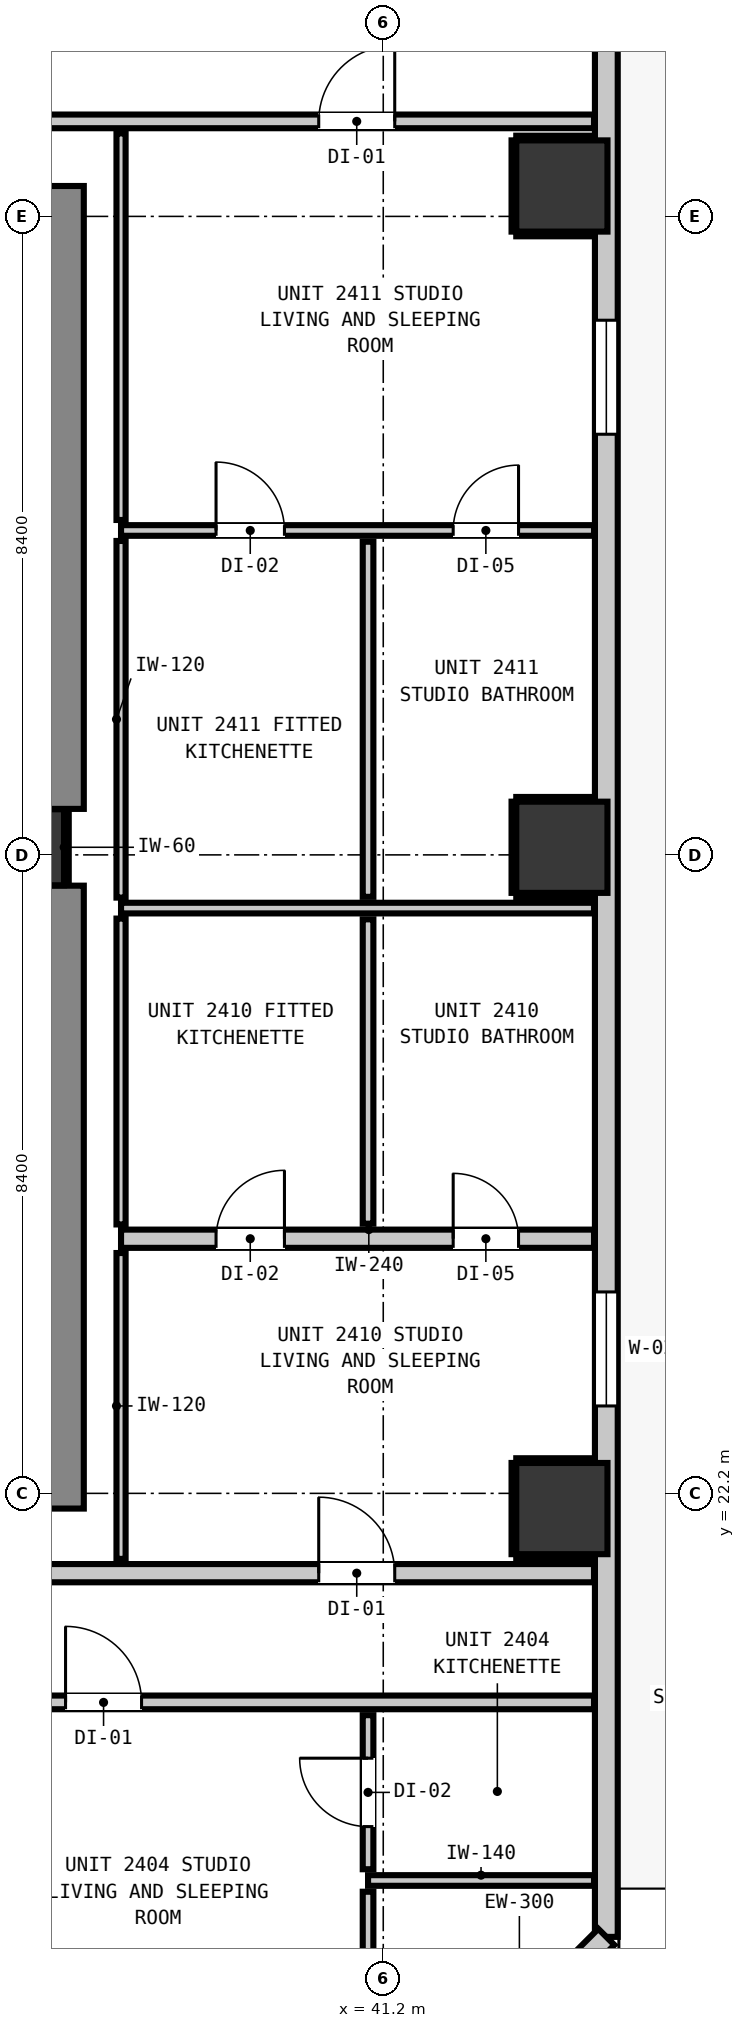
"""IFC4 building model, lengths in metres.
Left out: names, types, materials, properties, quantities, classifications, styles, units other than length and angle.
Written with IfcOpenShell. Run it as: python <this file> out.ifc"""

import sys

from ifc_helpers import new_model, si_unit, direction, frame, frame_2d, origin, origin_2d, place, context, subcontext, project, spatial, rectangle, extrude, element, fill, save


model = new_model("IFC4")
c1 = context("Model", 3, precision=1e-05, world=origin(), true_north=direction((0.0, 1.0)))
c2 = subcontext(c1, "Body", "Model", "MODEL_VIEW")
j1 = project(units=[si_unit("LENGTHUNIT", "METRE"), si_unit("PLANEANGLEUNIT", "RADIAN")], contexts=[c1])
p1 = place(None, origin())
s1 = spatial("IfcSite", under=j1, at=p1, CompositionType="ELEMENT")
p2 = place(p1, origin())
s2 = spatial("IfcBuilding", under=s1, at=p2, CompositionType="ELEMENT")
p3 = place(p2, frame((0.0, 0.0, 85.08)))
s3 = spatial("IfcBuildingStorey", under=s2, at=p3, CompositionType="ELEMENT", Elevation=85.08)
p4 = place(p3, frame((36.5, 30.7, 0.0), z_axis=(0.0, 0.0, 1.0), x_axis=(1.0, 0.0, 0.0)))
e1 = element("IfcColumn", 1, at=p4, inside=s3, PredefinedType="COLUMN", context=c2, shape_type="SweptSolid", body=[
    extrude(rectangle(XDim=1.0, YDim=1.0, at=origin_2d()), origin(), (0.0, 0.0, 1.0), 3.32),
])
p5 = place(p3, frame((36.66, 22.0, 0.0), z_axis=(0.0, 0.0, 1.0), x_axis=(0.0, 1.0, 0.0)))
e2 = element("IfcWall", 2, at=p5, inside=s3, PredefinedType="SHEAR", context=c2, shape_type="SweptSolid", body=[
    extrude(rectangle(XDim=8.195, YDim=1.2, at=frame_2d((4.098, 0.0))), origin(), (0.0, 0.0, 1.0), 3.32),
])
p6 = place(p3, frame((36.66, 31.205, 0.0), z_axis=(0.0, 0.0, 1.0), x_axis=(0.0, 1.0, 0.0)))
e3 = element("IfcWall", 3, at=p6, inside=s3, PredefinedType="SHEAR", context=c2, shape_type="SweptSolid", body=[
    extrude(rectangle(XDim=8.195, YDim=1.2, at=frame_2d((4.097, 0.0))), origin(), (0.0, 0.0, 1.0), 3.32),
])
for number, where, z_axis, x_axis in (
    (4, (43.55, 22.0, 0.0), (0.0, 0.0, 1.0), (1.0, 0.0, 0.0)),
    (5, (43.55, 30.7, 0.0), (0.0, 0.0, 1.0), (1.0, 0.0, 0.0)),
    (6, (43.55, 39.4, 0.0), (0.0, 0.0, 1.0), (1.0, 0.0, 0.0)),
):
    element("IfcColumn", number, at=place(p3, frame(where, z_axis=z_axis, x_axis=x_axis)), inside=s3, PredefinedType="COLUMN", context=c2, shape_type="SweptSolid", body=[
        extrude(rectangle(XDim=1.2, YDim=1.2, at=origin_2d()), origin(), (0.0, 0.0, 1.0), 3.32),
    ])
p7 = place(p3, frame((44.135, 51.035, 0.0), z_axis=(0.0, 0.0, 1.0), x_axis=(0.0, -1.0, 0.0)))
e7 = element("IfcWall", 7, at=p7, inside=s3, PredefinedType="STANDARD", context=c2, shape_type="SweptSolid", body=[
    extrude(rectangle(XDim=34.67, YDim=0.3, at=frame_2d((17.335, 0.0))), origin(), (0.0, 0.0, 1.0), 2.96),
])
p8 = place(p7, frame((0.901, 0.0, 0.0)))
e8 = element("IfcOpeningElement", 8, at=p8, cuts=e7, PredefinedType="OPENING", context=c2, shape_type="SweptSolid", body=[
    extrude(rectangle(XDim=1.0, YDim=2.15, at=frame_2d((0.5, 1.075))), frame((0.0, 0.16, 0.0), z_axis=(0.0, -1.0, 0.0), x_axis=(1.0, 0.0, 0.0)), (0.0, 0.0, 1.0), 0.32),
])
p9 = place(p7, frame((26.185, 0.0, 0.85)))
e9 = element("IfcOpeningElement", 9, at=p9, cuts=e7, PredefinedType="OPENING", context=c2, shape_type="SweptSolid", body=[
    extrude(rectangle(XDim=1.5, YDim=1.8, at=frame_2d((0.75, 0.9))), frame((0.0, 0.16, 0.0), z_axis=(0.0, -1.0, 0.0), x_axis=(1.0, 0.0, 0.0)), (0.0, 0.0, 1.0), 0.32),
])
p10 = place(p7, frame((13.401, 0.0, 0.85)))
e10 = element("IfcOpeningElement", 10, at=p10, cuts=e7, PredefinedType="OPENING", context=c2, shape_type="SweptSolid", body=[
    extrude(rectangle(XDim=1.5, YDim=1.8, at=frame_2d((0.75, 0.9))), frame((0.0, 0.16, 0.0), z_axis=(0.0, -1.0, 0.0), x_axis=(1.0, 0.0, 0.0)), (0.0, 0.0, 1.0), 0.32),
])
p11 = place(p3, frame((44.135, 16.365, 0.0), z_axis=(0.0, 0.0, 1.0), x_axis=(-0.707106781187, -0.707106781187, 0.0)))
e11 = element("IfcWall", 11, at=p11, inside=s3, PredefinedType="STANDARD", context=c2, shape_type="SweptSolid", body=[
    extrude(rectangle(XDim=3.536, YDim=0.3, at=frame_2d((1.768, 0.0))), origin(), (0.0, 0.0, 1.0), 2.96),
])
p12 = place(p3, frame((12.993, 21.15, 0.0), z_axis=(0.0, 0.0, 1.0), x_axis=(1.0, 0.0, 0.0)))
e12 = element("IfcWall", 12, at=p12, inside=s3, PredefinedType="PARTITIONING", context=c2, shape_type="SweptSolid", body=[
    extrude(rectangle(XDim=30.98, YDim=0.24, at=frame_2d((15.49, 0.0))), origin(), (0.0, 0.0, 1.0), 2.96),
])
p13 = place(p12, frame((5.217, 0.0, 0.0)))
e13 = element("IfcOpeningElement", 13, at=p13, cuts=e12, PredefinedType="OPENING", context=c2, shape_type="SweptSolid", body=[
    extrude(rectangle(XDim=1.1, YDim=2.15, at=frame_2d((0.55, 1.075))), frame((0.0, 0.13, 0.0), z_axis=(0.0, -1.0, 0.0), x_axis=(1.0, 0.0, 0.0)), (0.0, 0.0, 1.0), 0.26),
])
p14 = place(p12, frame((27.358, 0.0, 0.0)))
e14 = element("IfcOpeningElement", 14, at=p14, cuts=e12, PredefinedType="OPENING", context=c2, shape_type="SweptSolid", body=[
    extrude(rectangle(XDim=1.0, YDim=2.15, at=frame_2d((0.5, 1.075))), frame((0.0, 0.13, 0.0), z_axis=(0.0, -1.0, 0.0), x_axis=(1.0, 0.0, 0.0)), (0.0, 0.0, 1.0), 0.26),
])
p15 = place(p3, frame((37.75, 25.55, 0.0), z_axis=(0.0, 0.0, 1.0), x_axis=(1.0, 0.0, 0.0)))
e15 = element("IfcWall", 15, at=p15, inside=s3, PredefinedType="PARTITIONING", context=c2, shape_type="SweptSolid", body=[
    extrude(rectangle(XDim=6.223, YDim=0.24, at=frame_2d((3.111, 0.0))), origin(), (0.0, 0.0, 1.0), 2.96),
])
p16 = place(p15, frame((1.25, 0.0, 0.0)))
e16 = element("IfcOpeningElement", 16, at=p16, cuts=e15, PredefinedType="OPENING", context=c2, shape_type="SweptSolid", body=[
    extrude(rectangle(XDim=0.9, YDim=2.1, at=frame_2d((0.45, 1.05))), frame((0.0, 0.13, 0.0), z_axis=(0.0, -1.0, 0.0), x_axis=(1.0, 0.0, 0.0)), (0.0, 0.0, 1.0), 0.26),
])
p17 = place(p15, frame((4.37, 0.0, 0.0)))
e17 = element("IfcOpeningElement", 17, at=p17, cuts=e15, PredefinedType="OPENING", context=c2, shape_type="SweptSolid", body=[
    extrude(rectangle(XDim=0.86, YDim=2.02, at=frame_2d((0.43, 1.01))), frame((0.0, 0.13, 0.0), z_axis=(0.0, -1.0, 0.0), x_axis=(1.0, 0.0, 0.0)), (0.0, 0.0, 1.0), 0.26),
])
p18 = place(p3, frame((12.993, 19.45, 0.0), z_axis=(0.0, 0.0, 1.0), x_axis=(1.0, 0.0, 0.0)))
e18 = element("IfcWall", 18, at=p18, inside=s3, PredefinedType="PARTITIONING", context=c2, shape_type="SweptSolid", body=[
    extrude(rectangle(XDim=30.98, YDim=0.18, at=frame_2d((15.49, 0.0))), origin(), (0.0, 0.0, 1.0), 2.96),
])
p19 = place(p18, frame((0.11, 0.0, 0.0)))
e19 = element("IfcOpeningElement", 19, at=p19, cuts=e18, PredefinedType="OPENING", context=c2, shape_type="SweptSolid", body=[
    extrude(rectangle(XDim=1.0, YDim=2.15, at=frame_2d((0.5, 1.075))), frame((0.0, 0.1, 0.0), z_axis=(0.0, -1.0, 0.0), x_axis=(1.0, 0.0, 0.0)), (0.0, 0.0, 1.0), 0.2),
])
p20 = place(p18, frame((7.423, 0.0, 0.0)))
e20 = element("IfcOpeningElement", 20, at=p20, cuts=e18, PredefinedType="OPENING", context=c2, shape_type="SweptSolid", body=[
    extrude(rectangle(XDim=1.0, YDim=2.15, at=frame_2d((0.5, 1.075))), frame((0.0, 0.1, 0.0), z_axis=(0.0, -1.0, 0.0), x_axis=(1.0, 0.0, 0.0)), (0.0, 0.0, 1.0), 0.2),
])
p21 = place(p18, frame((16.083, 0.0, 0.0)))
e21 = element("IfcOpeningElement", 21, at=p21, cuts=e18, PredefinedType="OPENING", context=c2, shape_type="SweptSolid", body=[
    extrude(rectangle(XDim=1.0, YDim=2.15, at=frame_2d((0.5, 1.075))), frame((0.0, 0.1, 0.0), z_axis=(0.0, -1.0, 0.0), x_axis=(1.0, 0.0, 0.0)), (0.0, 0.0, 1.0), 0.2),
])
p22 = place(p18, frame((24.027, 0.0, 0.0)))
e22 = element("IfcOpeningElement", 22, at=p22, cuts=e18, PredefinedType="OPENING", context=c2, shape_type="SweptSolid", body=[
    extrude(rectangle(XDim=1.0, YDim=2.15, at=frame_2d((0.5, 1.075))), frame((0.0, 0.1, 0.0), z_axis=(0.0, -1.0, 0.0), x_axis=(1.0, 0.0, 0.0)), (0.0, 0.0, 1.0), 0.2),
])
p23 = place(p3, frame((1.827, 40.25, 0.0), z_axis=(0.0, 0.0, 1.0), x_axis=(1.0, 0.0, 0.0)))
e23 = element("IfcWall", 23, at=p23, inside=s3, PredefinedType="PARTITIONING", context=c2, shape_type="SweptSolid", body=[
    extrude(rectangle(XDim=42.146, YDim=0.18, at=frame_2d((21.073, 0.0))), origin(), (0.0, 0.0, 1.0), 2.96),
])
p24 = place(p23, frame((15.608, 0.0, 0.0)))
e24 = element("IfcOpeningElement", 24, at=p24, cuts=e23, PredefinedType="OPENING", context=c2, shape_type="SweptSolid", body=[
    extrude(rectangle(XDim=1.4, YDim=2.15, at=frame_2d((0.7, 1.075))), frame((0.0, 0.1, 0.0), z_axis=(0.0, -1.0, 0.0), x_axis=(1.0, 0.0, 0.0)), (0.0, 0.0, 1.0), 0.2),
])
p25 = place(p23, frame((8.647, 0.0, 0.0)))
e25 = element("IfcOpeningElement", 25, at=p25, cuts=e23, PredefinedType="OPENING", context=c2, shape_type="SweptSolid", body=[
    extrude(rectangle(XDim=1.4, YDim=2.15, at=frame_2d((0.7, 1.075))), frame((0.0, 0.1, 0.0), z_axis=(0.0, -1.0, 0.0), x_axis=(1.0, 0.0, 0.0)), (0.0, 0.0, 1.0), 0.2),
])
p26 = place(p23, frame((38.524, 0.0, 0.0)))
e26 = element("IfcOpeningElement", 26, at=p26, cuts=e23, PredefinedType="OPENING", context=c2, shape_type="SweptSolid", body=[
    extrude(rectangle(XDim=1.0, YDim=2.15, at=frame_2d((0.5, 1.075))), frame((0.0, 0.1, 0.0), z_axis=(0.0, -1.0, 0.0), x_axis=(1.0, 0.0, 0.0)), (0.0, 0.0, 1.0), 0.2),
])
p27 = place(p3, frame((41.0, 17.107, 0.0), z_axis=(0.0, 0.0, 1.0), x_axis=(1.0, 0.0, 0.0)))
e27 = element("IfcWall", 27, at=p27, inside=s3, PredefinedType="PARTITIONING", context=c2, shape_type="SweptSolid", body=[
    extrude(rectangle(XDim=2.973, YDim=0.14, at=frame_2d((1.486, 0.0))), origin(), (0.0, 0.0, 1.0), 2.96),
])
p28 = place(p3, frame((37.75, 29.9, 0.0), z_axis=(0.0, 0.0, 1.0), x_axis=(1.0, 0.0, 0.0)))
e28 = element("IfcWall", 28, at=p28, inside=s3, PredefinedType="PARTITIONING", context=c2, shape_type="SweptSolid", body=[
    extrude(rectangle(XDim=6.223, YDim=0.14, at=frame_2d((3.111, 0.0))), origin(), (0.0, 0.0, 1.0), 2.96),
])
p29 = place(p3, frame((37.75, 34.868, 0.0), z_axis=(0.0, 0.0, 1.0), x_axis=(1.0, 0.0, 0.0)))
e29 = element("IfcWall", 29, at=p29, inside=s3, PredefinedType="PARTITIONING", context=c2, shape_type="SweptSolid", body=[
    extrude(rectangle(XDim=6.223, YDim=0.14, at=frame_2d((3.111, 0.0))), origin(), (0.0, 0.0, 1.0), 2.96),
])
p30 = place(p29, frame((1.25, 0.0, 0.0)))
e30 = element("IfcOpeningElement", 30, at=p30, cuts=e29, PredefinedType="OPENING", context=c2, shape_type="SweptSolid", body=[
    extrude(rectangle(XDim=0.9, YDim=2.1, at=frame_2d((0.45, 1.05))), frame((0.0, 0.08, 0.0), z_axis=(0.0, -1.0, 0.0), x_axis=(1.0, 0.0, 0.0)), (0.0, 0.0, 1.0), 0.16),
])
p31 = place(p29, frame((4.37, 0.0, 0.0)))
e31 = element("IfcOpeningElement", 31, at=p31, cuts=e29, PredefinedType="OPENING", context=c2, shape_type="SweptSolid", body=[
    extrude(rectangle(XDim=0.86, YDim=2.02, at=frame_2d((0.43, 1.01))), frame((0.0, 0.08, 0.0), z_axis=(0.0, -1.0, 0.0), x_axis=(1.0, 0.0, 0.0)), (0.0, 0.0, 1.0), 0.16),
])
p32 = place(p3, frame((41.0, 14.027, 0.0), z_axis=(0.0, 0.0, 1.0), x_axis=(0.0, 1.0, 0.0)))
e32 = element("IfcWall", 32, at=p32, inside=s3, PredefinedType="PARTITIONING", context=c2, shape_type="SweptSolid", body=[
    extrude(rectangle(XDim=2.932, YDim=0.14, at=frame_2d((1.466, 0.0))), origin(), (0.0, 0.0, 1.0), 2.96),
])
p33 = place(p32, frame((1.109, 0.0, 0.0)))
e33 = element("IfcOpeningElement", 33, at=p33, cuts=e32, PredefinedType="OPENING", context=c2, shape_type="SweptSolid", body=[
    extrude(rectangle(XDim=0.86, YDim=2.02, at=frame_2d((0.43, 1.01))), frame((0.0, 0.08, 0.0), z_axis=(0.0, -1.0, 0.0), x_axis=(1.0, 0.0, 0.0)), (0.0, 0.0, 1.0), 0.16),
])
p34 = place(p3, frame((41.0, 17.255, 0.0), z_axis=(0.0, 0.0, 1.0), x_axis=(0.0, 1.0, 0.0)))
e34 = element("IfcWall", 34, at=p34, inside=s3, PredefinedType="PARTITIONING", context=c2, shape_type="SweptSolid", body=[
    extrude(rectangle(XDim=2.027, YDim=0.14, at=frame_2d((1.014, 0.0))), origin(), (0.0, 0.0, 1.0), 2.96),
])
p35 = place(p34, frame((0.561, 0.0, 0.0)))
e35 = element("IfcOpeningElement", 35, at=p35, cuts=e34, PredefinedType="OPENING", context=c2, shape_type="SweptSolid", body=[
    extrude(rectangle(XDim=0.9, YDim=2.1, at=frame_2d((0.45, 1.05))), frame((0.0, 0.08, 0.0), z_axis=(0.0, -1.0, 0.0), x_axis=(1.0, 0.0, 0.0)), (0.0, 0.0, 1.0), 0.16),
])
p36 = place(p3, frame((41.0, 25.748, 0.0), z_axis=(0.0, 0.0, 1.0), x_axis=(0.0, 1.0, 0.0)))
e36 = element("IfcWall", 36, at=p36, inside=s3, PredefinedType="PARTITIONING", context=c2, shape_type="SweptSolid", body=[
    extrude(rectangle(XDim=4.004, YDim=0.14, at=frame_2d((2.002, 0.0))), origin(), (0.0, 0.0, 1.0), 2.96),
])
p37 = place(p3, frame((41.0, 30.048, 0.0), z_axis=(0.0, 0.0, 1.0), x_axis=(0.0, 1.0, 0.0)))
e37 = element("IfcWall", 37, at=p37, inside=s3, PredefinedType="PARTITIONING", context=c2, shape_type="SweptSolid", body=[
    extrude(rectangle(XDim=4.672, YDim=0.14, at=frame_2d((2.336, 0.0))), origin(), (0.0, 0.0, 1.0), 2.96),
])
p38 = place(p3, frame((37.75, 21.338, 0.0), z_axis=(0.0, 0.0, 1.0), x_axis=(0.0, 1.0, 0.0)))
e38 = element("IfcWall", 38, at=p38, inside=s3, PredefinedType="PARTITIONING", context=c2, shape_type="SweptSolid", body=[
    extrude(rectangle(XDim=4.024, YDim=0.12, at=frame_2d((2.012, 0.0))), origin(), (0.0, 0.0, 1.0), 2.96),
])
p39 = place(p3, frame((37.75, 25.738, 0.0), z_axis=(0.0, 0.0, 1.0), x_axis=(0.0, 1.0, 0.0)))
e39 = element("IfcWall", 39, at=p39, inside=s3, PredefinedType="PARTITIONING", context=c2, shape_type="SweptSolid", body=[
    extrude(rectangle(XDim=4.024, YDim=0.12, at=frame_2d((2.012, 0.0))), origin(), (0.0, 0.0, 1.0), 2.96),
])
p40 = place(p3, frame((37.75, 30.038, 0.0), z_axis=(0.0, 0.0, 1.0), x_axis=(0.0, 1.0, 0.0)))
e40 = element("IfcWall", 40, at=p40, inside=s3, PredefinedType="PARTITIONING", context=c2, shape_type="SweptSolid", body=[
    extrude(rectangle(XDim=4.692, YDim=0.12, at=frame_2d((2.346, 0.0))), origin(), (0.0, 0.0, 1.0), 2.96),
])
p41 = place(p3, frame((37.75, 35.006, 0.0), z_axis=(0.0, 0.0, 1.0), x_axis=(0.0, 1.0, 0.0)))
e41 = element("IfcWall", 41, at=p41, inside=s3, PredefinedType="PARTITIONING", context=c2, shape_type="SweptSolid", body=[
    extrude(rectangle(XDim=5.086, YDim=0.12, at=frame_2d((2.543, 0.0))), origin(), (0.0, 0.0, 1.0), 2.96),
])
p42 = place(p3, frame((37.032, 30.21, 0.0), z_axis=(0.0, 0.0, 1.0), x_axis=(0.0, 1.0, 0.0)))
e42 = element("IfcWall", 42, at=p42, inside=s3, PredefinedType="PARTITIONING", context=c2, shape_type="SweptSolid", body=[
    extrude(rectangle(XDim=0.98, YDim=0.06, at=frame_2d((0.49, 0.0))), origin(), (0.0, 0.0, 1.0), 1.45),
])
for number, where, z_axis, x_axis in (
    (43, (42.95, 21.368, 0.0), (0.0, 0.0, 1.0), (1.0, 0.0, 0.0)),
    (44, (42.95, 22.632, 0.0), (0.0, 0.0, 1.0), (1.0, 0.0, 0.0)),
):
    element("IfcWall", number, at=place(p3, frame(where, z_axis=z_axis, x_axis=x_axis)), inside=s3, PredefinedType="PARTITIONING", context=c2, shape_type="SweptSolid", body=[
        extrude(rectangle(XDim=1.02, YDim=0.06, at=frame_2d((0.51, 0.0))), origin(), (0.0, 0.0, 1.0), 1.45),
    ])
p43 = place(p3, frame((42.918, 21.4, 0.0), z_axis=(0.0, 0.0, 1.0), x_axis=(0.0, 1.0, 0.0)))
e45 = element("IfcWall", 45, at=p43, inside=s3, PredefinedType="PARTITIONING", context=c2, shape_type="SweptSolid", body=[
    extrude(rectangle(XDim=1.2, YDim=0.06, at=frame_2d((0.6, 0.0))), origin(), (0.0, 0.0, 1.0), 1.45),
])
for number, where, z_axis, x_axis in (
    (46, (42.95, 30.068, 0.0), (0.0, 0.0, 1.0), (1.0, 0.0, 0.0)),
    (47, (42.95, 31.332, 0.0), (0.0, 0.0, 1.0), (1.0, 0.0, 0.0)),
):
    element("IfcWall", number, at=place(p3, frame(where, z_axis=z_axis, x_axis=x_axis)), inside=s3, PredefinedType="PARTITIONING", context=c2, shape_type="SweptSolid", body=[
        extrude(rectangle(XDim=1.02, YDim=0.06, at=frame_2d((0.51, 0.0))), origin(), (0.0, 0.0, 1.0), 1.45),
    ])
p44 = place(p3, frame((42.918, 30.1, 0.0), z_axis=(0.0, 0.0, 1.0), x_axis=(0.0, 1.0, 0.0)))
e48 = element("IfcWall", 48, at=p44, inside=s3, PredefinedType="PARTITIONING", context=c2, shape_type="SweptSolid", body=[
    extrude(rectangle(XDim=1.2, YDim=0.06, at=frame_2d((0.6, 0.0))), origin(), (0.0, 0.0, 1.0), 1.45),
])
for number, where, z_axis, x_axis in (
    (49, (42.95, 38.768, 0.0), (0.0, 0.0, 1.0), (1.0, 0.0, 0.0)),
    (50, (42.95, 40.032, 0.0), (0.0, 0.0, 1.0), (1.0, 0.0, 0.0)),
):
    element("IfcWall", number, at=place(p3, frame(where, z_axis=z_axis, x_axis=x_axis)), inside=s3, PredefinedType="PARTITIONING", context=c2, shape_type="SweptSolid", body=[
        extrude(rectangle(XDim=1.02, YDim=0.06, at=frame_2d((0.51, 0.0))), origin(), (0.0, 0.0, 1.0), 1.45),
    ])
p45 = place(p3, frame((42.918, 38.8, 0.0), z_axis=(0.0, 0.0, 1.0), x_axis=(0.0, 1.0, 0.0)))
e51 = element("IfcWall", 51, at=p45, inside=s3, PredefinedType="PARTITIONING", context=c2, shape_type="SweptSolid", body=[
    extrude(rectangle(XDim=1.2, YDim=0.06, at=frame_2d((0.6, 0.0))), origin(), (0.0, 0.0, 1.0), 1.45),
])
p46 = place(p9, origin())
e52 = element("IfcWindow", 52, at=p46, inside=s3, PartitioningType="SINGLE_PANEL", PredefinedType="WINDOW", context=c2, shape_type="SweptSolid", body=[
    extrude(rectangle(XDim=1.5, YDim=1.8, at=frame_2d((0.75, 0.9))), frame((0.0, 0.03, 0.0), z_axis=(0.0, -1.0, 0.0), x_axis=(1.0, 0.0, 0.0)), (0.0, 0.0, 1.0), 0.06),
])
fill(e9, e52)
p47 = place(p10, origin())
e53 = element("IfcWindow", 53, at=p47, inside=s3, PartitioningType="SINGLE_PANEL", PredefinedType="WINDOW", context=c2, shape_type="SweptSolid", body=[
    extrude(rectangle(XDim=1.5, YDim=1.8, at=frame_2d((0.75, 0.9))), frame((0.0, 0.03, 0.0), z_axis=(0.0, -1.0, 0.0), x_axis=(1.0, 0.0, 0.0)), (0.0, 0.0, 1.0), 0.06),
])
fill(e10, e53)
p48 = place(p22, origin())
e54 = element("IfcDoor", 54, at=p48, inside=s3, OperationType="SINGLE_SWING_LEFT", PredefinedType="DOOR", context=c2, shape_type="SweptSolid", body=[
    extrude(rectangle(XDim=1.0, YDim=2.15, at=frame_2d((0.5, 1.075))), frame((0.0, 0.025, 0.0), z_axis=(0.0, -1.0, 0.0), x_axis=(1.0, 0.0, 0.0)), (0.0, 0.0, 1.0), 0.05),
])
fill(e22, e54)
p49 = place(p35, origin())
e55 = element("IfcDoor", 55, at=p49, inside=s3, OperationType="SINGLE_SWING_RIGHT", PredefinedType="DOOR", context=c2, shape_type="SweptSolid", body=[
    extrude(rectangle(XDim=0.9, YDim=2.1, at=frame_2d((0.45, 1.05))), frame((0.0, 0.025, 0.0), z_axis=(0.0, -1.0, 0.0), x_axis=(1.0, 0.0, 0.0)), (0.0, 0.0, 1.0), 0.05),
])
fill(e35, e55)
p50 = place(p14, origin())
e56 = element("IfcDoor", 56, at=p50, inside=s3, OperationType="SINGLE_SWING_LEFT", PredefinedType="DOOR", context=c2, shape_type="SweptSolid", body=[
    extrude(rectangle(XDim=1.0, YDim=2.15, at=frame_2d((0.5, 1.075))), frame((0.0, 0.025, 0.0), z_axis=(0.0, -1.0, 0.0), x_axis=(1.0, 0.0, 0.0)), (0.0, 0.0, 1.0), 0.05),
])
fill(e14, e56)
p51 = place(p16, origin())
e57 = element("IfcDoor", 57, at=p51, inside=s3, OperationType="SINGLE_SWING_RIGHT", PredefinedType="DOOR", context=c2, shape_type="SweptSolid", body=[
    extrude(rectangle(XDim=0.9, YDim=2.1, at=frame_2d((0.45, 1.05))), frame((0.0, 0.025, 0.0), z_axis=(0.0, -1.0, 0.0), x_axis=(1.0, 0.0, 0.0)), (0.0, 0.0, 1.0), 0.05),
])
fill(e16, e57)
p52 = place(p17, origin())
e58 = element("IfcDoor", 58, at=p52, inside=s3, OperationType="SINGLE_SWING_LEFT", PredefinedType="DOOR", context=c2, shape_type="SweptSolid", body=[
    extrude(rectangle(XDim=0.86, YDim=2.02, at=frame_2d((0.43, 1.01))), frame((0.0, 0.025, 0.0), z_axis=(0.0, -1.0, 0.0), x_axis=(1.0, 0.0, 0.0)), (0.0, 0.0, 1.0), 0.05),
])
fill(e17, e58)
p53 = place(p26, origin())
e59 = element("IfcDoor", 59, at=p53, inside=s3, OperationType="SINGLE_SWING_RIGHT", PredefinedType="DOOR", context=c2, shape_type="SweptSolid", body=[
    extrude(rectangle(XDim=1.0, YDim=2.15, at=frame_2d((0.5, 1.075))), frame((0.0, 0.025, 0.0), z_axis=(0.0, -1.0, 0.0), x_axis=(1.0, 0.0, 0.0)), (0.0, 0.0, 1.0), 0.05),
])
fill(e26, e59)
p54 = place(p30, origin())
e60 = element("IfcDoor", 60, at=p54, inside=s3, OperationType="SINGLE_SWING_LEFT", PredefinedType="DOOR", context=c2, shape_type="SweptSolid", body=[
    extrude(rectangle(XDim=0.9, YDim=2.1, at=frame_2d((0.45, 1.05))), frame((0.0, 0.025, 0.0), z_axis=(0.0, -1.0, 0.0), x_axis=(1.0, 0.0, 0.0)), (0.0, 0.0, 1.0), 0.05),
])
fill(e30, e60)
p55 = place(p31, origin())
e61 = element("IfcDoor", 61, at=p55, inside=s3, OperationType="SINGLE_SWING_RIGHT", PredefinedType="DOOR", context=c2, shape_type="SweptSolid", body=[
    extrude(rectangle(XDim=0.86, YDim=2.02, at=frame_2d((0.43, 1.01))), frame((0.0, 0.025, 0.0), z_axis=(0.0, -1.0, 0.0), x_axis=(1.0, 0.0, 0.0)), (0.0, 0.0, 1.0), 0.05),
])
fill(e31, e61)
save(model, sys.argv[1])
